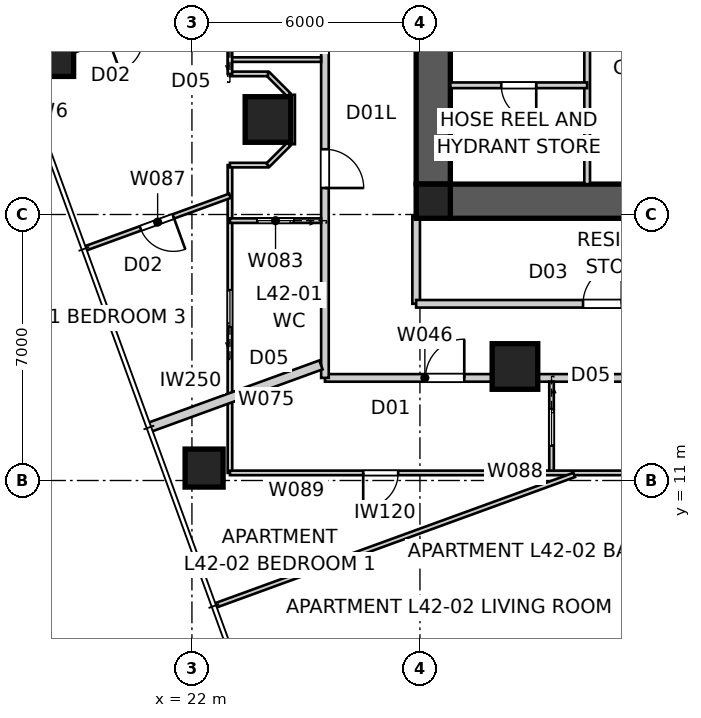
"""IFC4 building model, lengths in metres.
Left out: names, types, materials, properties, quantities, classifications, styles, units other than length and angle.
Written with IfcOpenShell. Run it as: python <this file> out.ifc"""

import sys

from ifc_helpers import new_model, si_unit, direction, frame, frame_2d, origin, origin_2d, place, context, subcontext, project, spatial, polyline, rectangle, outline, extrude, element, fill, save


model = new_model("IFC4")
c1 = context("Model", 3, precision=1e-05, world=origin(), true_north=direction((0.0, 1.0)))
c2 = subcontext(c1, "Body", "Model", "MODEL_VIEW")
j1 = project(units=[si_unit("LENGTHUNIT", "METRE"), si_unit("PLANEANGLEUNIT", "RADIAN")], contexts=[c1])
p1 = place(None, origin())
s1 = spatial("IfcSite", under=j1, at=p1, CompositionType="ELEMENT")
p2 = place(p1, origin())
s2 = spatial("IfcBuilding", under=s1, at=p2, CompositionType="ELEMENT")
p3 = place(p2, frame((0.0, 0.0, 154.0)))
s3 = spatial("IfcBuildingStorey", under=s2, at=p3, CompositionType="ELEMENT", Elevation=154.0)
p4 = place(p3, frame((51.2, 18.35, 0.0), z_axis=(0.0, 0.0, 1.0), x_axis=(-1.0, 0.0, 0.0)))
e1 = element("IfcWall", 1, at=p4, inside=s3, PredefinedType="SHEAR", context=c2, shape_type="SweptSolid", body=[
    extrude(outline(polyline([(0.0, -0.45), (22.4, -0.45), (22.4, -0.025), (22.85, -0.025), (22.85, 0.025), (22.4, 0.025), (22.4, 0.45), (0.0, 0.45), (0.0, 0.025), (-0.45, 0.025), (-0.45, -0.025), (0.0, -0.025), (0.0, -0.45)])), origin(), (0.0, 0.0, 1.0), 3.4),
])
p5 = place(p3, frame((28.35, 41.2, 0.0), z_axis=(0.0, 0.0, 1.0), x_axis=(0.0, -1.0, 0.0)))
e2 = element("IfcWall", 2, at=p5, inside=s3, PredefinedType="SHEAR", context=c2, shape_type="SweptSolid", body=[
    extrude(outline(polyline([(0.0, -0.45), (22.4, -0.45), (22.4, -0.025), (22.85, -0.025), (22.85, 0.025), (22.4, 0.025), (22.4, 0.45), (0.0, 0.45), (0.0, 0.025), (-0.45, 0.025), (-0.45, -0.025), (0.0, -0.025), (0.0, -0.45)])), origin(), (0.0, 0.0, 1.0), 3.4),
])
p6 = place(p5, frame((11.14, 0.0, 0.0)))
e3 = element("IfcOpeningElement", 3, at=p6, cuts=e2, PredefinedType="OPENING", context=c2, shape_type="SweptSolid", body=[
    extrude(rectangle(XDim=1.02, YDim=2.4, at=frame_2d((0.51, 1.2))), frame((0.0, 0.46, 0.0), z_axis=(0.0, -1.0, 0.0), x_axis=(1.0, 0.0, 0.0)), (0.0, 0.0, 1.0), 0.92),
])
p7 = place(p3, frame((28.35, 18.35, 0.0), z_axis=(0.0, 0.0, 1.0), x_axis=(1.0, 0.0, 0.0)))
e4 = element("IfcColumn", 4, at=p7, inside=s3, PredefinedType="COLUMN", context=c2, shape_type="SweptSolid", body=[
    extrude(rectangle(XDim=0.9, YDim=0.9, at=origin_2d()), origin(), (0.0, 0.0, 1.0), 3.4),
])
for number, where, z_axis, x_axis in (
    (5, (18.387, 22.134, 0.0), (0.0, 0.0, 1.0), (1.0, 0.0, 0.0)),
    (6, (22.32, 11.327, 0.0), (0.0, 0.0, 1.0), (1.0, 0.0, 0.0)),
):
    element("IfcColumn", number, at=place(p3, frame(where, z_axis=z_axis, x_axis=x_axis)), inside=s3, PredefinedType="COLUMN", context=c2, shape_type="SweptSolid", body=[
        extrude(rectangle(XDim=1.0, YDim=1.0, at=origin_2d()), origin(), (0.0, 0.0, 1.0), 3.4),
    ])
for number, where, z_axis, x_axis in (
    (7, (24.0, 20.5, 0.0), (0.0, 0.0, 1.0), (1.0, 0.0, 0.0)),
    (8, (30.5, 14.0, 0.0), (0.0, 0.0, 1.0), (1.0, 0.0, 0.0)),
):
    element("IfcColumn", number, at=place(p3, frame(where, z_axis=z_axis, x_axis=x_axis)), inside=s3, PredefinedType="COLUMN", context=c2, shape_type="SweptSolid", body=[
        extrude(rectangle(XDim=1.2, YDim=1.2, at=origin_2d()), origin(), (0.0, 0.0, 1.0), 3.4),
    ])
p8 = place(p3, frame((25.5, 13.7, 0.0), z_axis=(0.0, 0.0, 1.0), x_axis=(1.0, 0.0, 0.0)))
e9 = element("IfcWall", 9, at=p8, inside=s3, PredefinedType="PARTITIONING", context=c2, shape_type="SweptSolid", body=[
    extrude(rectangle(XDim=5.258, YDim=0.2, at=frame_2d((2.629, 0.0))), origin(), (0.0, 0.0, 1.0), 3.25),
])
p9 = place(p8, frame((2.646, 0.0, 0.0)))
e10 = element("IfcOpeningElement", 10, at=p9, cuts=e9, PredefinedType="OPENING", context=c2, shape_type="SweptSolid", body=[
    extrude(rectangle(XDim=1.02, YDim=2.34, at=frame_2d((0.51, 1.17))), frame((0.0, 0.11, 0.0), z_axis=(0.0, -1.0, 0.0), x_axis=(1.0, 0.0, 0.0)), (0.0, 0.0, 1.0), 0.22),
])
p10 = place(p3, frame((30.758, 13.7, 0.0), z_axis=(0.0, 0.0, 1.0), x_axis=(1.0, 0.0, 0.0)))
e11 = element("IfcWall", 11, at=p10, inside=s3, PredefinedType="PARTITIONING", context=c2, shape_type="SweptSolid", body=[
    extrude(rectangle(XDim=1.683, YDim=0.2, at=frame_2d((0.842, 0.0))), origin(), (0.0, 0.0, 1.0), 2.55),
])
p11 = place(p3, frame((32.442, 13.7, 0.0), z_axis=(0.0, 0.0, 1.0), x_axis=(1.0, 0.0, 0.0)))
e12 = element("IfcWall", 12, at=p11, inside=s3, PredefinedType="PARTITIONING", context=c2, shape_type="SweptSolid", body=[
    extrude(rectangle(XDim=15.117, YDim=0.2, at=frame_2d((7.558, 0.0))), origin(), (0.0, 0.0, 1.0), 3.25),
])
p12 = place(p11, frame((12.755, 0.0, 0.0)))
e13 = element("IfcOpeningElement", 13, at=p12, cuts=e12, PredefinedType="OPENING", context=c2, shape_type="SweptSolid", body=[
    extrude(rectangle(XDim=1.02, YDim=2.34, at=frame_2d((0.51, 1.17))), frame((0.0, 0.11, 0.0), z_axis=(0.0, -1.0, 0.0), x_axis=(1.0, 0.0, 0.0)), (0.0, 0.0, 1.0), 0.22),
])
p13 = place(p3, frame((25.5, 47.1, 0.0), z_axis=(0.0, 0.0, 1.0), x_axis=(0.0, -1.0, 0.0)))
e14 = element("IfcWall", 14, at=p13, inside=s3, PredefinedType="PARTITIONING", context=c2, shape_type="SweptSolid", body=[
    extrude(rectangle(XDim=33.4, YDim=0.2, at=frame_2d((16.7, 0.0))), origin(), (0.0, 0.0, 1.0), 3.25),
])
p14 = place(p13, frame((2.52, 0.0, 0.0)))
e15 = element("IfcOpeningElement", 15, at=p14, cuts=e14, PredefinedType="OPENING", context=c2, shape_type="SweptSolid", body=[
    extrude(rectangle(XDim=1.02, YDim=2.34, at=frame_2d((0.51, 1.17))), frame((0.0, 0.11, 0.0), z_axis=(0.0, -1.0, 0.0), x_axis=(1.0, 0.0, 0.0)), (0.0, 0.0, 1.0), 0.22),
])
p15 = place(p13, frame((27.383, 0.0, 0.0)))
e16 = element("IfcOpeningElement", 16, at=p15, cuts=e14, PredefinedType="OPENING", context=c2, shape_type="SweptSolid", body=[
    extrude(rectangle(XDim=1.02, YDim=2.1, at=frame_2d((0.51, 1.05))), frame((0.0, 0.11, 0.0), z_axis=(0.0, -1.0, 0.0), x_axis=(1.0, 0.0, 0.0)), (0.0, 0.0, 1.0), 0.22),
])
p16 = place(p3, frame((20.868, 12.395, 0.0), z_axis=(0.0, 0.0, 1.0), x_axis=(0.939677962656, 0.342060413521, 0.0)))
e17 = element("IfcWall", 17, at=p16, inside=s3, PredefinedType="PARTITIONING", context=c2, shape_type="SweptSolid", body=[
    extrude(rectangle(XDim=4.818, YDim=0.25, at=frame_2d((2.409, 0.0))), origin(), (0.0, 0.0, 1.0), 3.25),
])
p17 = place(p3, frame((32.4, 18.8, 0.0), z_axis=(0.0, 0.0, 1.0), x_axis=(0.0, 1.0, 0.0)))
e18 = element("IfcWall", 18, at=p17, inside=s3, PredefinedType="SOLIDWALL", context=c2, shape_type="SweptSolid", body=[
    extrude(rectangle(XDim=5.9, YDim=0.15, at=frame_2d((2.95, 0.0))), origin(), (0.0, 0.0, 1.0), 3.25),
])
p18 = place(p3, frame((32.4, 21.4, 0.0), z_axis=(0.0, 0.0, 1.0), x_axis=(-1.0, 0.0, 0.0)))
e19 = element("IfcWall", 19, at=p18, inside=s3, PredefinedType="SOLIDWALL", context=c2, shape_type="SweptSolid", body=[
    extrude(rectangle(XDim=3.6, YDim=0.15, at=frame_2d((1.8, 0.0))), origin(), (0.0, 0.0, 1.0), 3.25),
])
p19 = place(p18, frame((1.34, 0.0, 0.0)))
e20 = element("IfcOpeningElement", 20, at=p19, cuts=e19, PredefinedType="OPENING", context=c2, shape_type="SweptSolid", body=[
    extrude(rectangle(XDim=0.92, YDim=2.1, at=frame_2d((0.46, 1.05))), frame((0.0, 0.085, 0.0), z_axis=(0.0, -1.0, 0.0), x_axis=(1.0, 0.0, 0.0)), (0.0, 0.0, 1.0), 0.17),
])
p20 = place(p3, frame((27.9, 17.95, 0.0), z_axis=(0.0, 0.0, 1.0), x_axis=(0.0, -1.0, 0.0)))
e21 = element("IfcWall", 21, at=p20, inside=s3, PredefinedType="PARTITIONING", context=c2, shape_type="SweptSolid", body=[
    extrude(rectangle(XDim=2.3, YDim=0.2, at=frame_2d((1.15, 0.0))), origin(), (0.0, 0.0, 1.0), 3.25),
])
p21 = place(p3, frame((27.9, 15.65, 0.0), z_axis=(0.0, 0.0, 1.0), x_axis=(1.0, 0.0, 0.0)))
e22 = element("IfcWall", 22, at=p21, inside=s3, PredefinedType="PARTITIONING", context=c2, shape_type="SweptSolid", body=[
    extrude(rectangle(XDim=24.2, YDim=0.2, at=frame_2d((12.1, 0.0))), origin(), (0.0, 0.0, 1.0), 3.25),
])
p22 = place(p21, frame((4.391, 0.0, 0.0)))
e23 = element("IfcOpeningElement", 23, at=p22, cuts=e22, PredefinedType="OPENING", context=c2, shape_type="SweptSolid", body=[
    extrude(rectangle(XDim=1.02, YDim=2.1, at=frame_2d((0.51, 1.05))), frame((0.0, 0.11, 0.0), z_axis=(0.0, -1.0, 0.0), x_axis=(1.0, 0.0, 0.0)), (0.0, 0.0, 1.0), 0.22),
])
p23 = place(p21, frame((18.789, 0.0, 0.0)))
e24 = element("IfcOpeningElement", 24, at=p23, cuts=e22, PredefinedType="OPENING", context=c2, shape_type="SweptSolid", body=[
    extrude(rectangle(XDim=1.02, YDim=2.1, at=frame_2d((0.51, 1.05))), frame((0.0, 0.11, 0.0), z_axis=(0.0, -1.0, 0.0), x_axis=(1.0, 0.0, 0.0)), (0.0, 0.0, 1.0), 0.22),
])
p24 = place(p21, frame((11.59, 0.0, 0.0)))
e25 = element("IfcOpeningElement", 25, at=p24, cuts=e22, PredefinedType="OPENING", context=c2, shape_type="SweptSolid", body=[
    extrude(rectangle(XDim=1.02, YDim=2.1, at=frame_2d((0.51, 1.05))), frame((0.0, 0.11, 0.0), z_axis=(0.0, -1.0, 0.0), x_axis=(1.0, 0.0, 0.0)), (0.0, 0.0, 1.0), 0.22),
])
p25 = place(p3, frame((23.0, 22.076, 0.0), z_axis=(0.0, 0.0, 1.0), x_axis=(1.0, 0.0, 0.0)))
e26 = element("IfcWall", 26, at=p25, inside=s3, PredefinedType="PARTITIONING", context=c2, shape_type="SweptSolid", body=[
    extrude(rectangle(XDim=2.4, YDim=0.12, at=frame_2d((1.2, 0.0))), origin(), (0.0, 0.0, 1.0), 3.25),
])
p26 = place(p3, frame((23.0, 11.2, 0.0), z_axis=(0.0, 0.0, 1.0), x_axis=(0.0, 1.0, 0.0)))
e27 = element("IfcWall", 27, at=p26, inside=s3, PredefinedType="PARTITIONING", context=c2, shape_type="SweptSolid", body=[
    extrude(rectangle(XDim=8.1, YDim=0.12, at=frame_2d((4.05, 0.0))), origin(), (0.0, 0.0, 1.0), 3.25),
])
p27 = place(p26, frame((3.849, 0.0, 0.0)))
e28 = element("IfcOpeningElement", 28, at=p27, cuts=e27, PredefinedType="OPENING", context=c2, shape_type="SweptSolid", body=[
    extrude(rectangle(XDim=0.96, YDim=2.1, at=frame_2d((0.48, 1.05))), frame((0.0, 0.07, 0.0), z_axis=(0.0, -1.0, 0.0), x_axis=(1.0, 0.0, 0.0)), (0.0, 0.0, 1.0), 0.14),
])
p28 = place(p3, frame((23.0, 19.3, 0.0), z_axis=(0.0, 0.0, 1.0), x_axis=(1.0, 0.0, 0.0)))
e29 = element("IfcWall", 29, at=p28, inside=s3, PredefinedType="PARTITIONING", context=c2, shape_type="SweptSolid", body=[
    extrude(rectangle(XDim=1.0, YDim=0.12, at=frame_2d((0.5, 0.0))), origin(), (0.0, 0.0, 1.0), 3.25),
])
p29 = place(p3, frame((24.0, 19.3, 0.0), z_axis=(0.0, 0.0, 1.0), x_axis=(0.707106781187, 0.707106781187, 0.0)))
e30 = element("IfcWall", 30, at=p29, inside=s3, PredefinedType="PARTITIONING", context=c2, shape_type="SweptSolid", body=[
    extrude(rectangle(XDim=0.778, YDim=0.12, at=frame_2d((0.389, 0.0))), origin(), (0.0, 0.0, 1.0), 3.25),
])
p30 = place(p3, frame((24.65, 19.85, 0.0), z_axis=(0.0, 0.0, 1.0), x_axis=(0.0, 1.0, 0.0)))
e31 = element("IfcWall", 31, at=p30, inside=s3, PredefinedType="PARTITIONING", context=c2, shape_type="SweptSolid", body=[
    extrude(rectangle(XDim=1.3, YDim=0.12, at=frame_2d((0.65, 0.0))), origin(), (0.0, 0.0, 1.0), 3.25),
])
p31 = place(p3, frame((24.55, 21.15, 0.0), z_axis=(0.0, 0.0, 1.0), x_axis=(-0.707106781187, 0.707106781187, 0.0)))
e32 = element("IfcWall", 32, at=p31, inside=s3, PredefinedType="PARTITIONING", context=c2, shape_type="SweptSolid", body=[
    extrude(rectangle(XDim=0.778, YDim=0.12, at=frame_2d((0.389, 0.0))), origin(), (0.0, 0.0, 1.0), 3.25),
])
p32 = place(p3, frame((24.0, 21.7, 0.0), z_axis=(0.0, 0.0, 1.0), x_axis=(-1.0, 0.0, 0.0)))
e33 = element("IfcWall", 33, at=p32, inside=s3, PredefinedType="PARTITIONING", context=c2, shape_type="SweptSolid", body=[
    extrude(rectangle(XDim=1.0, YDim=0.12, at=frame_2d((0.5, 0.0))), origin(), (0.0, 0.0, 1.0), 3.25),
])
p33 = place(p3, frame((23.0, 21.7, 0.0), z_axis=(0.0, 0.0, 1.0), x_axis=(0.0, 1.0, 0.0)))
e34 = element("IfcWall", 34, at=p33, inside=s3, PredefinedType="PARTITIONING", context=c2, shape_type="SweptSolid", body=[
    extrude(rectangle(XDim=19.512, YDim=0.12, at=frame_2d((9.756, 0.0))), origin(), (0.0, 0.0, 1.0), 2.55),
])
p34 = place(p33, frame((14.961, 0.0, 0.0)))
e35 = element("IfcOpeningElement", 35, at=p34, cuts=e34, PredefinedType="OPENING", context=c2, shape_type="SweptSolid", body=[
    extrude(rectangle(XDim=0.96, YDim=2.1, at=frame_2d((0.48, 1.05))), frame((0.0, 0.07, 0.0), z_axis=(0.0, -1.0, 0.0), x_axis=(1.0, 0.0, 0.0)), (0.0, 0.0, 1.0), 0.14),
])
p35 = place(p33, frame((0.641, 0.0, 0.0)))
e36 = element("IfcOpeningElement", 36, at=p35, cuts=e34, PredefinedType="OPENING", context=c2, shape_type="SweptSolid", body=[
    extrude(rectangle(XDim=0.96, YDim=2.1, at=frame_2d((0.48, 1.05))), frame((0.0, 0.07, 0.0), z_axis=(0.0, -1.0, 0.0), x_axis=(1.0, 0.0, 0.0)), (0.0, 0.0, 1.0), 0.14),
])
p36 = place(p33, frame((9.587, 0.0, 0.0)))
e37 = element("IfcOpeningElement", 37, at=p36, cuts=e34, PredefinedType="OPENING", context=c2, shape_type="SweptSolid", body=[
    extrude(rectangle(XDim=0.96, YDim=2.1, at=frame_2d((0.48, 1.05))), frame((0.0, 0.07, 0.0), z_axis=(0.0, -1.0, 0.0), x_axis=(1.0, 0.0, 0.0)), (0.0, 0.0, 1.0), 0.14),
])
p37 = place(p3, frame((25.4, 17.838, 0.0), z_axis=(0.0, 0.0, 1.0), x_axis=(-1.0, 0.0, 0.0)))
e38 = element("IfcWall", 38, at=p37, inside=s3, PredefinedType="PARTITIONING", context=c2, shape_type="SweptSolid", body=[
    extrude(rectangle(XDim=2.4, YDim=0.12, at=frame_2d((1.2, 0.0))), origin(), (0.0, 0.0, 1.0), 3.25),
])
p38 = place(p37, frame((0.72, 0.0, 0.0)))
e39 = element("IfcOpeningElement", 39, at=p38, cuts=e38, PredefinedType="OPENING", context=c2, shape_type="SweptSolid", body=[
    extrude(rectangle(XDim=0.96, YDim=2.1, at=frame_2d((0.48, 1.05))), frame((0.0, 0.07, 0.0), z_axis=(0.0, -1.0, 0.0), x_axis=(1.0, 0.0, 0.0)), (0.0, 0.0, 1.0), 0.14),
])
p39 = place(p3, frame((23.0, 23.812, 0.0), z_axis=(0.0, 0.0, 1.0), x_axis=(-0.939693791822, -0.342016925912, 0.0)))
e40 = element("IfcWall", 40, at=p39, inside=s3, PredefinedType="PARTITIONING", context=c2, shape_type="SweptSolid", body=[
    extrude(rectangle(XDim=5.869, YDim=0.12, at=frame_2d((2.935, 0.0))), origin(), (0.0, 0.0, 1.0), 3.25),
])
p40 = place(p39, frame((2.494, 0.0, 0.0)))
e41 = element("IfcOpeningElement", 41, at=p40, cuts=e40, PredefinedType="OPENING", context=c2, shape_type="SweptSolid", body=[
    extrude(rectangle(XDim=0.92, YDim=2.34, at=frame_2d((0.46, 1.17))), frame((0.0, 0.07, 0.0), z_axis=(0.0, -1.0, 0.0), x_axis=(1.0, 0.0, 0.0)), (0.0, 0.0, 1.0), 0.14),
])
p41 = place(p3, frame((23.0, 18.492, 0.0), z_axis=(0.0, 0.0, 1.0), x_axis=(-0.939682468191, -0.342048036063, 0.0)))
e42 = element("IfcWall", 42, at=p41, inside=s3, PredefinedType="PARTITIONING", context=c2, shape_type="SweptSolid", body=[
    extrude(rectangle(XDim=4.049, YDim=0.12, at=frame_2d((2.024, 0.0))), origin(), (0.0, 0.0, 1.0), 3.25),
])
p42 = place(p41, frame((1.584, 0.0, 0.0)))
e43 = element("IfcOpeningElement", 43, at=p42, cuts=e42, PredefinedType="OPENING", context=c2, shape_type="SweptSolid", body=[
    extrude(rectangle(XDim=0.92, YDim=2.34, at=frame_2d((0.46, 1.17))), frame((0.0, 0.07, 0.0), z_axis=(0.0, -1.0, 0.0), x_axis=(1.0, 0.0, 0.0)), (0.0, 0.0, 1.0), 0.14),
])
p43 = place(p3, frame((31.462, 13.6, 0.0), z_axis=(0.0, 0.0, 1.0), x_axis=(0.0, -1.0, 0.0)))
e44 = element("IfcWall", 44, at=p43, inside=s3, PredefinedType="PARTITIONING", context=c2, shape_type="SweptSolid", body=[
    extrude(rectangle(XDim=2.4, YDim=0.12, at=frame_2d((1.2, 0.0))), origin(), (0.0, 0.0, 1.0), 3.25),
])
p44 = place(p43, frame((0.72, 0.0, 0.0)))
e45 = element("IfcOpeningElement", 45, at=p44, cuts=e44, PredefinedType="OPENING", context=c2, shape_type="SweptSolid", body=[
    extrude(rectangle(XDim=0.96, YDim=2.1, at=frame_2d((0.48, 1.05))), frame((0.0, 0.07, 0.0), z_axis=(0.0, -1.0, 0.0), x_axis=(1.0, 0.0, 0.0)), (0.0, 0.0, 1.0), 0.14),
])
p45 = place(p3, frame((43.098, 11.2, 0.0), z_axis=(0.0, 0.0, 1.0), x_axis=(-1.0, 0.0, 0.0)))
e46 = element("IfcWall", 46, at=p45, inside=s3, PredefinedType="PARTITIONING", context=c2, shape_type="SweptSolid", body=[
    extrude(rectangle(XDim=20.098, YDim=0.12, at=frame_2d((10.049, 0.0))), origin(), (0.0, 0.0, 1.0), 3.25),
])
p46 = place(p45, frame((15.671, 0.0, 0.0)))
e47 = element("IfcOpeningElement", 47, at=p46, cuts=e46, PredefinedType="OPENING", context=c2, shape_type="SweptSolid", body=[
    extrude(rectangle(XDim=0.92, YDim=2.34, at=frame_2d((0.46, 1.17))), frame((0.0, 0.07, 0.0), z_axis=(0.0, -1.0, 0.0), x_axis=(1.0, 0.0, 0.0)), (0.0, 0.0, 1.0), 0.14),
])
p47 = place(p45, frame((8.488, 0.0, 0.0)))
e48 = element("IfcOpeningElement", 48, at=p47, cuts=e46, PredefinedType="OPENING", context=c2, shape_type="SweptSolid", body=[
    extrude(rectangle(XDim=0.96, YDim=2.1, at=frame_2d((0.48, 1.05))), frame((0.0, 0.07, 0.0), z_axis=(0.0, -1.0, 0.0), x_axis=(1.0, 0.0, 0.0)), (0.0, 0.0, 1.0), 0.14),
])
p48 = place(p45, frame((0.185, 0.0, 0.0)))
e49 = element("IfcOpeningElement", 49, at=p48, cuts=e46, PredefinedType="OPENING", context=c2, shape_type="SweptSolid", body=[
    extrude(rectangle(XDim=0.96, YDim=2.1, at=frame_2d((0.48, 1.05))), frame((0.0, 0.07, 0.0), z_axis=(0.0, -1.0, 0.0), x_axis=(1.0, 0.0, 0.0)), (0.0, 0.0, 1.0), 0.14),
])
p49 = place(p45, frame((4.484, 0.0, 0.0)))
e50 = element("IfcOpeningElement", 50, at=p49, cuts=e46, PredefinedType="OPENING", context=c2, shape_type="SweptSolid", body=[
    extrude(rectangle(XDim=0.96, YDim=2.1, at=frame_2d((0.48, 1.05))), frame((0.0, 0.07, 0.0), z_axis=(0.0, -1.0, 0.0), x_axis=(1.0, 0.0, 0.0)), (0.0, 0.0, 1.0), 0.14),
])
p50 = place(p3, frame((22.615, 7.71, 0.0), z_axis=(0.0, 0.0, 1.0), x_axis=(0.939687691256, 0.342033686794, 0.0)))
e51 = element("IfcWall", 51, at=p50, inside=s3, PredefinedType="PARTITIONING", context=c2, shape_type="SweptSolid", body=[
    extrude(rectangle(XDim=10.05, YDim=0.12, at=frame_2d((5.025, 0.0))), origin(), (0.0, 0.0, 1.0), 3.25),
])
p51 = place(p3, frame((37.356, 8.026, 0.0), z_axis=(0.0, 0.0, 1.0), x_axis=(-0.939704826744, -0.34198660587, 0.0)))
e52 = element("IfcWall", 52, at=p51, inside=s3, PredefinedType="PARTITIONING", context=c2, shape_type="SweptSolid", body=[
    extrude(rectangle(XDim=4.99, YDim=0.12, at=frame_2d((2.495, 0.0))), origin(), (0.0, 0.0, 1.0), 3.25),
])
p52 = place(p51, frame((2.035, 0.0, 0.0)))
e53 = element("IfcOpeningElement", 53, at=p52, cuts=e52, PredefinedType="OPENING", context=c2, shape_type="SweptSolid", body=[
    extrude(rectangle(XDim=0.92, YDim=2.34, at=frame_2d((0.46, 1.17))), frame((0.0, 0.07, 0.0), z_axis=(0.0, -1.0, 0.0), x_axis=(1.0, 0.0, 0.0)), (0.0, 0.0, 1.0), 0.14),
])
p53 = place(p22, origin())
e54 = element("IfcDoor", 54, at=p53, inside=s3, OperationType="SINGLE_SWING_RIGHT", PredefinedType="DOOR", context=c2, shape_type="SweptSolid", body=[
    extrude(rectangle(XDim=1.02, YDim=2.1, at=frame_2d((0.51, 1.05))), frame((0.0, 0.025, 0.0), z_axis=(0.0, -1.0, 0.0), x_axis=(1.0, 0.0, 0.0)), (0.0, 0.0, 1.0), 0.05),
])
fill(e23, e54)
p54 = place(p9, origin())
e55 = element("IfcDoor", 55, at=p54, inside=s3, OperationType="SINGLE_SWING_RIGHT", PredefinedType="DOOR", context=c2, shape_type="SweptSolid", body=[
    extrude(rectangle(XDim=1.02, YDim=2.34, at=frame_2d((0.51, 1.17))), frame((0.0, 0.025, 0.0), z_axis=(0.0, -1.0, 0.0), x_axis=(1.0, 0.0, 0.0)), (0.0, 0.0, 1.0), 0.05),
])
fill(e10, e55)
p55 = place(p15, origin())
e56 = element("IfcDoor", 56, at=p55, inside=s3, OperationType="SINGLE_SWING_RIGHT", PredefinedType="DOOR", context=c2, shape_type="SweptSolid", body=[
    extrude(rectangle(XDim=1.02, YDim=2.1, at=frame_2d((0.51, 1.05))), frame((0.0, 0.025, 0.0), z_axis=(0.0, -1.0, 0.0), x_axis=(1.0, 0.0, 0.0)), (0.0, 0.0, 1.0), 0.05),
])
fill(e16, e56)
p56 = place(p19, origin())
e57 = element("IfcDoor", 57, at=p56, inside=s3, OperationType="SINGLE_SWING_LEFT", PredefinedType="DOOR", context=c2, shape_type="SweptSolid", body=[
    extrude(rectangle(XDim=0.92, YDim=2.1, at=frame_2d((0.46, 1.05))), frame((0.0, 0.025, 0.0), z_axis=(0.0, -1.0, 0.0), x_axis=(1.0, 0.0, 0.0)), (0.0, 0.0, 1.0), 0.05),
])
fill(e20, e57)
p57 = place(p46, origin())
e58 = element("IfcDoor", 58, at=p57, inside=s3, OperationType="SINGLE_SWING_RIGHT", PredefinedType="DOOR", context=c2, shape_type="SweptSolid", body=[
    extrude(rectangle(XDim=0.92, YDim=2.34, at=frame_2d((0.46, 1.17))), frame((0.0, 0.025, 0.0), z_axis=(0.0, -1.0, 0.0), x_axis=(1.0, 0.0, 0.0)), (0.0, 0.0, 1.0), 0.05),
])
fill(e47, e58)
p58 = place(p44, origin())
e59 = element("IfcDoor", 59, at=p58, inside=s3, OperationType="SLIDING_TO_LEFT", PredefinedType="DOOR", context=c2, shape_type="SweptSolid", body=[
    extrude(rectangle(XDim=0.96, YDim=2.1, at=frame_2d((0.48, 1.05))), frame((0.0, 0.025, 0.0), z_axis=(0.0, -1.0, 0.0), x_axis=(1.0, 0.0, 0.0)), (0.0, 0.0, 1.0), 0.05),
])
fill(e45, e59)
p59 = place(p38, origin())
e60 = element("IfcDoor", 60, at=p59, inside=s3, OperationType="SLIDING_TO_LEFT", PredefinedType="DOOR", context=c2, shape_type="SweptSolid", body=[
    extrude(rectangle(XDim=0.96, YDim=2.1, at=frame_2d((0.48, 1.05))), frame((0.0, 0.025, 0.0), z_axis=(0.0, -1.0, 0.0), x_axis=(1.0, 0.0, 0.0)), (0.0, 0.0, 1.0), 0.05),
])
fill(e39, e60)
p60 = place(p27, origin())
e61 = element("IfcDoor", 61, at=p60, inside=s3, OperationType="SLIDING_TO_LEFT", PredefinedType="DOOR", context=c2, shape_type="SweptSolid", body=[
    extrude(rectangle(XDim=0.96, YDim=2.1, at=frame_2d((0.48, 1.05))), frame((0.0, 0.025, 0.0), z_axis=(0.0, -1.0, 0.0), x_axis=(1.0, 0.0, 0.0)), (0.0, 0.0, 1.0), 0.05),
])
fill(e28, e61)
p61 = place(p42, origin())
e62 = element("IfcDoor", 62, at=p61, inside=s3, OperationType="SINGLE_SWING_LEFT", PredefinedType="DOOR", context=c2, shape_type="SweptSolid", body=[
    extrude(rectangle(XDim=0.92, YDim=2.34, at=frame_2d((0.46, 1.17))), frame((0.0, 0.025, 0.0), z_axis=(0.0, -1.0, 0.0), x_axis=(1.0, 0.0, 0.0)), (0.0, 0.0, 1.0), 0.05),
])
fill(e43, e62)
save(model, sys.argv[1])
